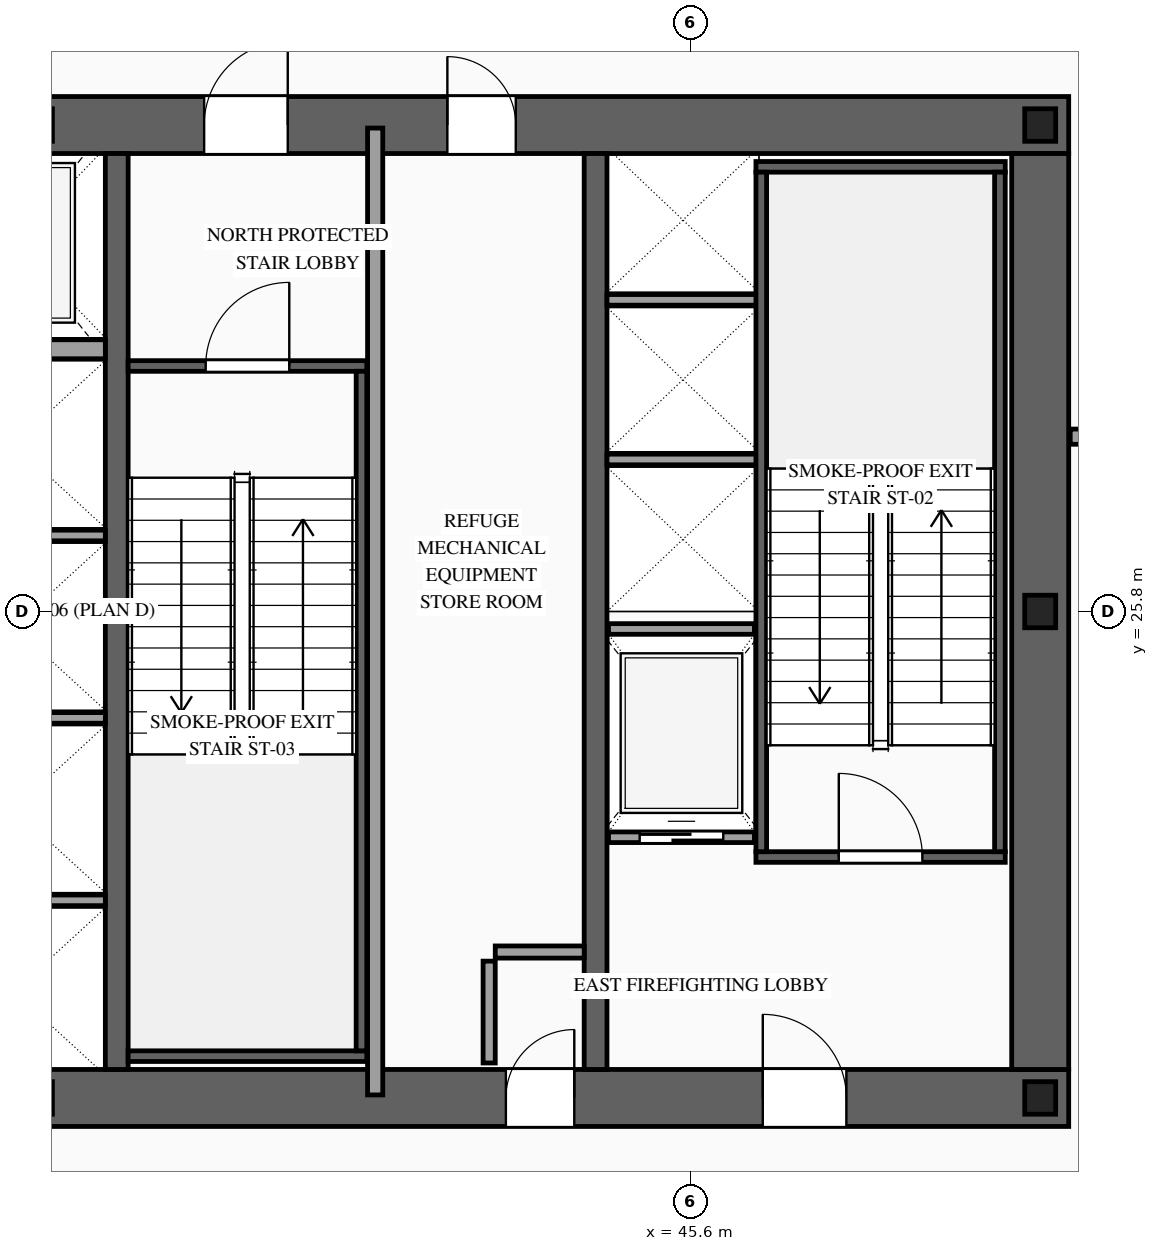
"""IFC4 building model, lengths in metres.
Left out: names, types, materials, properties, quantities, classifications, styles, units other than length and angle.
Written with IfcOpenShell. Run it as: python <this file> out.ifc"""

import sys

from ifc_helpers import new_model, si_unit, direction, frame, frame_2d, origin, origin_2d, place, context, subcontext, project, spatial, rectangle, i_section, extrude, source, transform, mapped, element, fill, save


model = new_model("IFC4")
c1 = context("Model", 3, precision=1e-05, world=origin(), true_north=direction((0.0, 1.0)))
c2 = subcontext(c1, "Body", "Model", "MODEL_VIEW")
j1 = project(units=[si_unit("LENGTHUNIT", "METRE"), si_unit("PLANEANGLEUNIT", "RADIAN")], contexts=[c1])
p1 = place(None, origin())
s1 = spatial("IfcSite", under=j1, at=p1, CompositionType="ELEMENT")
p2 = place(p1, origin())
s2 = spatial("IfcBuilding", under=s1, at=p2, CompositionType="ELEMENT")
p3 = place(p2, frame((0.0, 0.0, 85.6)))
s3 = spatial("IfcBuildingStorey", under=s2, at=p3, CompositionType="ELEMENT", Elevation=85.6)
p4 = place(p3, frame((23.425, 19.4, 0.0), z_axis=(0.0, 0.0, 1.0), x_axis=(1.0, 0.0, 0.0)))
e1 = element("IfcWall", 1, at=p4, inside=s3, PredefinedType="SHEAR", context=c2, shape_type="SweptSolid", body=[
    extrude(rectangle(XDim=27.15, YDim=0.75, at=frame_2d((13.575, 0.0))), origin(), (0.0, 0.0, 1.0), 4.6),
])
p5 = place(p4, frame((2.025, 0.0, 0.0)))
e2 = element("IfcOpeningElement", 2, at=p5, cuts=e1, PredefinedType="OPENING", context=c2, shape_type="SweptSolid", body=[
    extrude(rectangle(XDim=1.1, YDim=2.2, at=frame_2d((0.55, 1.1))), frame((0.0, 0.39, 0.0), z_axis=(0.0, -1.0, 0.0), x_axis=(1.0, 0.0, 0.0)), (0.0, 0.0, 1.0), 0.78),
])
p6 = place(p4, frame((9.925, 0.0, 0.0)))
e3 = element("IfcOpeningElement", 3, at=p6, cuts=e1, PredefinedType="OPENING", context=c2, shape_type="SweptSolid", body=[
    extrude(rectangle(XDim=1.1, YDim=2.2, at=frame_2d((0.55, 1.1))), frame((0.0, 0.39, 0.0), z_axis=(0.0, -1.0, 0.0), x_axis=(1.0, 0.0, 0.0)), (0.0, 0.0, 1.0), 0.78),
])
p7 = place(p4, frame((23.125, 0.0, 0.0)))
e4 = element("IfcOpeningElement", 4, at=p7, cuts=e1, PredefinedType="OPENING", context=c2, shape_type="SweptSolid", body=[
    extrude(rectangle(XDim=1.1, YDim=2.2, at=frame_2d((0.55, 1.1))), frame((0.0, 0.39, 0.0), z_axis=(0.0, -1.0, 0.0), x_axis=(1.0, 0.0, 0.0)), (0.0, 0.0, 1.0), 0.78),
])
p8 = place(p4, frame((19.745, 0.0, 0.0)))
e5 = element("IfcOpeningElement", 5, at=p8, cuts=e1, PredefinedType="OPENING", context=c2, shape_type="SweptSolid", body=[
    extrude(rectangle(XDim=0.9, YDim=2.15, at=frame_2d((0.45, 1.075))), frame((0.0, 0.39, 0.0), z_axis=(0.0, -1.0, 0.0), x_axis=(1.0, 0.0, 0.0)), (0.0, 0.0, 1.0), 0.78),
])
p9 = place(p3, frame((23.425, 32.2, 0.0), z_axis=(0.0, 0.0, 1.0), x_axis=(1.0, 0.0, 0.0)))
e6 = element("IfcWall", 6, at=p9, inside=s3, PredefinedType="SHEAR", context=c2, shape_type="SweptSolid", body=[
    extrude(rectangle(XDim=27.15, YDim=0.75, at=frame_2d((13.575, 0.0))), origin(), (0.0, 0.0, 1.0), 4.6),
])
p10 = place(p9, frame((4.645, 0.0, 0.0)))
e7 = element("IfcOpeningElement", 7, at=p10, cuts=e6, PredefinedType="OPENING", context=c2, shape_type="SweptSolid", body=[
    extrude(rectangle(XDim=0.9, YDim=2.15, at=frame_2d((0.45, 1.075))), frame((0.0, 0.39, 0.0), z_axis=(0.0, -1.0, 0.0), x_axis=(1.0, 0.0, 0.0)), (0.0, 0.0, 1.0), 0.78),
])
p11 = place(p9, frame((9.925, 0.0, 0.0)))
e8 = element("IfcOpeningElement", 8, at=p11, cuts=e6, PredefinedType="OPENING", context=c2, shape_type="SweptSolid", body=[
    extrude(rectangle(XDim=1.1, YDim=2.2, at=frame_2d((0.55, 1.1))), frame((0.0, 0.39, 0.0), z_axis=(0.0, -1.0, 0.0), x_axis=(1.0, 0.0, 0.0)), (0.0, 0.0, 1.0), 0.78),
])
p12 = place(p9, frame((15.775, 0.0, 0.0)))
e9 = element("IfcOpeningElement", 9, at=p12, cuts=e6, PredefinedType="OPENING", context=c2, shape_type="SweptSolid", body=[
    extrude(rectangle(XDim=1.1, YDim=2.2, at=frame_2d((0.55, 1.1))), frame((0.0, 0.39, 0.0), z_axis=(0.0, -1.0, 0.0), x_axis=(1.0, 0.0, 0.0)), (0.0, 0.0, 1.0), 0.78),
])
p13 = place(p9, frame((18.975, 0.0, 0.0)))
e10 = element("IfcOpeningElement", 10, at=p13, cuts=e6, PredefinedType="OPENING", context=c2, shape_type="SweptSolid", body=[
    extrude(rectangle(XDim=0.9, YDim=2.15, at=frame_2d((0.45, 1.075))), frame((0.0, 0.39, 0.0), z_axis=(0.0, -1.0, 0.0), x_axis=(1.0, 0.0, 0.0)), (0.0, 0.0, 1.0), 0.78),
])
m1 = source(origin(), c2, "Body", "SweptSolid", [
    extrude(rectangle(XDim=12.05, YDim=0.75, at=frame_2d((6.025, 0.0))), origin(), (0.0, 0.0, 1.0), 4.6),
])
p14 = place(p3, frame((50.2, 19.775, 0.0), z_axis=(0.0, 0.0, 1.0), x_axis=(0.0, 1.0, 0.0)))
e11 = element("IfcWall", 11, at=p14, inside=s3, PredefinedType="SHEAR", context=c2, shape_type="MappedRepresentation", body=[
    mapped(m1, transform((0.0, 0.0, 0.0), scale=1.0)),
])
m2 = source(origin(), c2, "Body", "SweptSolid", [
    extrude(rectangle(XDim=12.05, YDim=0.3, at=frame_2d((6.025, 0.0))), origin(), (0.0, 0.0, 1.0), 4.6),
])
for number, where, z_axis, x_axis in (
    (12, (38.05, 19.775, 0.0), (0.0, 0.0, 1.0), (0.0, 1.0, 0.0)),
    (13, (44.35, 19.775, 0.0), (0.0, 0.0, 1.0), (0.0, 1.0, 0.0)),
):
    element("IfcWall", number, at=place(p3, frame(where, z_axis=z_axis, x_axis=x_axis)), inside=s3, PredefinedType="SOLIDWALL", context=c2, shape_type="MappedRepresentation", body=[
        mapped(m2, transform((0.0, 0.0, 0.0), scale=1.0)),
    ])
m3 = source(origin(), c2, "Body", "SweptSolid", [
    extrude(i_section(OverallWidth=0.407, OverallDepth=0.428, WebThickness=0.02, FlangeThickness=0.035, at=origin_2d()), origin(), (0.0, 0.0, 1.0), 4.6),
])
for number, where, z_axis, x_axis in (
    (14, (37.0, 19.4, 0.0), (0.0, 0.0, 1.0), (1.0, 0.0, 0.0)),
    (15, (50.2, 19.4, 0.0), (0.0, 0.0, 1.0), (1.0, 0.0, 0.0)),
    (16, (50.2, 25.8, 0.0), (0.0, 0.0, 1.0), (1.0, 0.0, 0.0)),
    (17, (37.0, 32.2, 0.0), (0.0, 0.0, 1.0), (1.0, 0.0, 0.0)),
    (18, (50.2, 32.2, 0.0), (0.0, 0.0, 1.0), (1.0, 0.0, 0.0)),
):
    element("IfcColumn", number, at=place(p3, frame(where, z_axis=z_axis, x_axis=x_axis)), inside=s3, PredefinedType="COLUMN", context=c2, shape_type="MappedRepresentation", body=[
        mapped(m3, transform((0.0, 0.0, 0.0), scale=1.0)),
    ])
p15 = place(p3, frame((44.52, 22.83, 0.0), z_axis=(0.0, 0.0, 1.0), x_axis=(1.0, 0.0, 0.0)))
e19 = element("IfcWall", 19, at=p15, inside=s3, PredefinedType="SOLIDWALL", context=c2, shape_type="SweptSolid", body=[
    extrude(rectangle(XDim=1.92, YDim=0.14, at=frame_2d((0.96, 0.0))), origin(), (0.0, 0.0, 1.0), 4.38),
])
p16 = place(p15, frame((0.41, 0.0, 0.0)))
e20 = element("IfcOpeningElement", 20, at=p16, cuts=e19, PredefinedType="OPENING", context=c2, shape_type="SweptSolid", body=[
    extrude(rectangle(XDim=1.1, YDim=2.2, at=frame_2d((0.55, 1.1))), frame((0.0, 0.085, 0.0), z_axis=(0.0, -1.0, 0.0), x_axis=(1.0, 0.0, 0.0)), (0.0, 0.0, 1.0), 0.17),
])
m4 = source(origin(), c2, "Body", "SweptSolid", [
    extrude(rectangle(XDim=1.92, YDim=0.14, at=frame_2d((0.96, 0.0))), origin(), (0.0, 0.0, 1.0), 4.38),
])
p17 = place(p3, frame((44.52, 25.57, 0.0), z_axis=(0.0, 0.0, 1.0), x_axis=(1.0, 0.0, 0.0)))
e21 = element("IfcWall", 21, at=p17, inside=s3, PredefinedType="SOLIDWALL", context=c2, shape_type="MappedRepresentation", body=[
    mapped(m4, transform((0.0, 0.0, 0.0), scale=1.0)),
])
m5 = source(origin(), c2, "Body", "SweptSolid", [
    extrude(rectangle(XDim=2.4, YDim=0.14, at=frame_2d((1.2, 0.0))), origin(), (0.0, 0.0, 1.0), 4.38),
])
for number, where, z_axis, x_axis in (
    (22, (35.5, 22.0, 0.0), (0.0, 0.0, 1.0), (1.0, 0.0, 0.0)),
    (23, (35.5, 24.4, 0.0), (0.0, 0.0, 1.0), (1.0, 0.0, 0.0)),
    (24, (35.5, 26.8, 0.0), (0.0, 0.0, 1.0), (1.0, 0.0, 0.0)),
):
    element("IfcWall", number, at=place(p3, frame(where, z_axis=z_axis, x_axis=x_axis)), inside=s3, PredefinedType="SOLIDWALL", context=c2, shape_type="MappedRepresentation", body=[
        mapped(m5, transform((0.0, 0.0, 0.0), scale=1.0)),
    ])
m6 = source(origin(), c2, "Body", "SweptSolid", [
    extrude(rectangle(XDim=2.4, YDim=0.25, at=frame_2d((1.2, 0.0))), origin(), (0.0, 0.0, 1.0), 4.38),
])
p18 = place(p3, frame((35.5, 29.25, 0.0), z_axis=(0.0, 0.0, 1.0), x_axis=(1.0, 0.0, 0.0)))
e25 = element("IfcWall", 25, at=p18, inside=s3, PredefinedType="SOLIDWALL", context=c2, shape_type="MappedRepresentation", body=[
    mapped(m6, transform((0.0, 0.0, 0.0), scale=1.0)),
])
m7 = source(origin(), c2, "Body", "SweptSolid", [
    extrude(rectangle(XDim=2.0, YDim=0.14, at=frame_2d((1.0, 0.0))), origin(), (0.0, 0.0, 1.0), 4.38),
])
for number, where, z_axis, x_axis in (
    (26, (44.5, 27.8, 0.0), (0.0, 0.0, 1.0), (1.0, 0.0, 0.0)),
    (27, (44.5, 29.9, 0.0), (0.0, 0.0, 1.0), (1.0, 0.0, 0.0)),
):
    element("IfcWall", number, at=place(p3, frame(where, z_axis=z_axis, x_axis=x_axis)), inside=s3, PredefinedType="SOLIDWALL", context=c2, shape_type="MappedRepresentation", body=[
        mapped(m7, transform((0.0, 0.0, 0.0), scale=1.0)),
    ])
p19 = place(p3, frame((46.46, 22.57, 0.0), z_axis=(0.0, 0.0, 1.0), x_axis=(1.0, 0.0, 0.0)))
e28 = element("IfcWall", 28, at=p19, inside=s3, PredefinedType="SOLIDWALL", context=c2, shape_type="SweptSolid", body=[
    extrude(rectangle(XDim=3.28, YDim=0.14, at=frame_2d((1.64, 0.0))), origin(), (0.0, 0.0, 1.0), 4.38),
])
p20 = place(p19, frame((1.09, 0.0, 0.0)))
e29 = element("IfcOpeningElement", 29, at=p20, cuts=e28, PredefinedType="OPENING", context=c2, shape_type="SweptSolid", body=[
    extrude(rectangle(XDim=1.1, YDim=2.2, at=frame_2d((0.55, 1.1))), frame((0.0, 0.085, 0.0), z_axis=(0.0, -1.0, 0.0), x_axis=(1.0, 0.0, 0.0)), (0.0, 0.0, 1.0), 0.17),
])
m8 = source(origin(), c2, "Body", "SweptSolid", [
    extrude(rectangle(XDim=3.28, YDim=0.14, at=frame_2d((1.64, 0.0))), origin(), (0.0, 0.0, 1.0), 4.38),
])
p21 = place(p3, frame((46.46, 31.65, 0.0), z_axis=(0.0, 0.0, 1.0), x_axis=(1.0, 0.0, 0.0)))
e30 = element("IfcWall", 30, at=p21, inside=s3, PredefinedType="SOLIDWALL", context=c2, shape_type="MappedRepresentation", body=[
    mapped(m8, transform((0.0, 0.0, 0.0), scale=1.0)),
])
m9 = source(origin(), c2, "Body", "SweptSolid", [
    extrude(rectangle(XDim=8.94, YDim=0.14, at=frame_2d((4.47, 0.0))), origin(), (0.0, 0.0, 1.0), 4.38),
])
for number, where, z_axis, x_axis in (
    (31, (46.53, 22.64, 0.0), (0.0, 0.0, 1.0), (0.0, 1.0, 0.0)),
    (32, (49.67, 22.64, 0.0), (0.0, 0.0, 1.0), (0.0, 1.0, 0.0)),
):
    element("IfcWall", number, at=place(p3, frame(where, z_axis=z_axis, x_axis=x_axis)), inside=s3, PredefinedType="SOLIDWALL", context=c2, shape_type="MappedRepresentation", body=[
        mapped(m9, transform((0.0, 0.0, 0.0), scale=1.0)),
    ])
p22 = place(p3, frame((38.2, 29.03, 0.0), z_axis=(0.0, 0.0, 1.0), x_axis=(1.0, 0.0, 0.0)))
e33 = element("IfcWall", 33, at=p22, inside=s3, PredefinedType="SOLIDWALL", context=c2, shape_type="SweptSolid", body=[
    extrude(rectangle(XDim=3.14, YDim=0.14, at=frame_2d((1.57, 0.0))), origin(), (0.0, 0.0, 1.0), 4.38),
])
p23 = place(p22, frame((1.02, 0.0, 0.0)))
e34 = element("IfcOpeningElement", 34, at=p23, cuts=e33, PredefinedType="OPENING", context=c2, shape_type="SweptSolid", body=[
    extrude(rectangle(XDim=1.1, YDim=2.2, at=frame_2d((0.55, 1.1))), frame((0.0, 0.085, 0.0), z_axis=(0.0, -1.0, 0.0), x_axis=(1.0, 0.0, 0.0)), (0.0, 0.0, 1.0), 0.17),
])
m10 = source(origin(), c2, "Body", "SweptSolid", [
    extrude(rectangle(XDim=3.14, YDim=0.14, at=frame_2d((1.57, 0.0))), origin(), (0.0, 0.0, 1.0), 4.38),
])
p24 = place(p3, frame((38.2, 19.95, 0.0), z_axis=(0.0, 0.0, 1.0), x_axis=(1.0, 0.0, 0.0)))
e35 = element("IfcWall", 35, at=p24, inside=s3, PredefinedType="SOLIDWALL", context=c2, shape_type="MappedRepresentation", body=[
    mapped(m10, transform((0.0, 0.0, 0.0), scale=1.0)),
])
m11 = source(origin(), c2, "Body", "SweptSolid", [
    extrude(rectangle(XDim=8.94, YDim=0.14, at=frame_2d((4.47, 0.0))), origin(), (0.0, 0.0, 1.0), 4.38),
])
p25 = place(p3, frame((41.27, 20.02, 0.0), z_axis=(0.0, 0.0, 1.0), x_axis=(0.0, 1.0, 0.0)))
e36 = element("IfcWall", 36, at=p25, inside=s3, PredefinedType="SOLIDWALL", context=c2, shape_type="MappedRepresentation", body=[
    mapped(m11, transform((0.0, 0.0, 0.0), scale=1.0)),
])
m12 = source(origin(), c2, "Body", "SweptSolid", [
    extrude(rectangle(XDim=1.34, YDim=0.16, at=frame_2d((0.67, 0.0))), origin(), (0.0, 0.0, 1.0), 4.38),
])
p26 = place(p3, frame((42.95, 19.86, 0.0), z_axis=(0.0, 0.0, 1.0), x_axis=(0.0, 1.0, 0.0)))
e37 = element("IfcWall", 37, at=p26, inside=s3, PredefinedType="PARTITIONING", context=c2, shape_type="MappedRepresentation", body=[
    mapped(m12, transform((0.0, 0.0, 0.0), scale=1.0)),
])
m13 = source(origin(), c2, "Body", "SweptSolid", [
    extrude(rectangle(XDim=1.17, YDim=0.16, at=frame_2d((0.585, 0.0))), origin(), (0.0, 0.0, 1.0), 4.38),
])
p27 = place(p3, frame((43.03, 21.32, 0.0), z_axis=(0.0, 0.0, 1.0), x_axis=(1.0, 0.0, 0.0)))
e38 = element("IfcWall", 38, at=p27, inside=s3, PredefinedType="PARTITIONING", context=c2, shape_type="MappedRepresentation", body=[
    mapped(m13, transform((0.0, 0.0, 0.0), scale=1.0)),
])
m14 = source(origin(), c2, "Body", "SweptSolid", [
    extrude(rectangle(XDim=12.72, YDim=0.2, at=frame_2d((6.36, 0.0))), origin(), (0.0, 0.0, 1.0), 4.38),
])
p28 = place(p3, frame((41.45, 19.44, 0.0), z_axis=(0.0, 0.0, 1.0), x_axis=(0.0, 1.0, 0.0)))
e39 = element("IfcWall", 39, at=p28, inside=s3, PredefinedType="PARTITIONING", context=c2, shape_type="MappedRepresentation", body=[
    mapped(m14, transform((0.0, 0.0, 0.0), scale=1.0)),
])
m15 = source(origin(), c2, "Body", "SweptSolid", [
    extrude(rectangle(XDim=1.455, YDim=0.2, at=frame_2d((0.728, 0.0))), origin(), (0.0, 0.0, 1.0), 4.38),
])
p29 = place(p3, frame((50.595, 28.1, 0.0), z_axis=(0.0, 0.0, 1.0), x_axis=(1.0, 0.0, 0.0)))
e40 = element("IfcWall", 40, at=p29, inside=s3, PredefinedType="PARTITIONING", context=c2, shape_type="MappedRepresentation", body=[
    mapped(m15, transform((0.0, 0.0, 0.0), scale=1.0)),
])
m16 = source(origin(), c2, "Body", "SweptSolid", [
    extrude(rectangle(XDim=1.1, YDim=2.2, at=frame_2d((0.55, 1.1))), frame((0.0, 0.025, 0.0), z_axis=(0.0, -1.0, 0.0), x_axis=(1.0, 0.0, 0.0)), (0.0, 0.0, 1.0), 0.05),
])
p30 = place(p16, origin())
e41 = element("IfcDoor", 41, at=p30, inside=s3, OperationType="SLIDING_TO_RIGHT", PredefinedType="DOOR", context=c2, shape_type="MappedRepresentation", body=[
    mapped(m16, transform((0.0, 0.0, 0.0), scale=1.0)),
])
fill(e20, e41)
m17 = source(origin(), c2, "Body", "SweptSolid", [
    extrude(rectangle(XDim=1.1, YDim=2.2, at=frame_2d((0.55, 1.1))), frame((0.0, 0.025, 0.0), z_axis=(0.0, -1.0, 0.0), x_axis=(1.0, 0.0, 0.0)), (0.0, 0.0, 1.0), 0.05),
])
p31 = place(p20, origin())
e42 = element("IfcDoor", 42, at=p31, inside=s3, OperationType="SINGLE_SWING_LEFT", PredefinedType="DOOR", context=c2, shape_type="MappedRepresentation", body=[
    mapped(m17, transform((0.0, 0.0, 0.0), scale=1.0)),
])
fill(e29, e42)
p32 = place(p23, origin())
e43 = element("IfcDoor", 43, at=p32, inside=s3, OperationType="SINGLE_SWING_RIGHT", PredefinedType="DOOR", context=c2, shape_type="MappedRepresentation", body=[
    mapped(m17, transform((0.0, 0.0, 0.0), scale=1.0)),
])
fill(e34, e43)
p33 = place(p7, origin())
e44 = element("IfcDoor", 44, at=p33, inside=s3, OperationType="SINGLE_SWING_LEFT", PredefinedType="DOOR", context=c2, shape_type="MappedRepresentation", body=[
    mapped(m17, transform((0.0, 0.0, 0.0), scale=1.0)),
])
fill(e4, e44)
p34 = place(p12, origin())
e45 = element("IfcDoor", 45, at=p34, inside=s3, OperationType="SINGLE_SWING_RIGHT", PredefinedType="DOOR", context=c2, shape_type="MappedRepresentation", body=[
    mapped(m17, transform((0.0, 0.0, 0.0), scale=1.0)),
])
fill(e9, e45)
m18 = source(origin(), c2, "Body", "SweptSolid", [
    extrude(rectangle(XDim=0.9, YDim=2.15, at=frame_2d((0.45, 1.075))), frame((0.0, 0.025, 0.0), z_axis=(0.0, -1.0, 0.0), x_axis=(1.0, 0.0, 0.0)), (0.0, 0.0, 1.0), 0.05),
])
p35 = place(p8, origin())
e46 = element("IfcDoor", 46, at=p35, inside=s3, OperationType="SINGLE_SWING_RIGHT", PredefinedType="DOOR", context=c2, shape_type="MappedRepresentation", body=[
    mapped(m18, transform((0.0, 0.0, 0.0), scale=1.0)),
])
fill(e5, e46)
p36 = place(p13, origin())
e47 = element("IfcDoor", 47, at=p36, inside=s3, OperationType="SINGLE_SWING_LEFT", PredefinedType="DOOR", context=c2, shape_type="MappedRepresentation", body=[
    mapped(m18, transform((0.0, 0.0, 0.0), scale=1.0)),
])
fill(e10, e47)
save(model, sys.argv[1])
